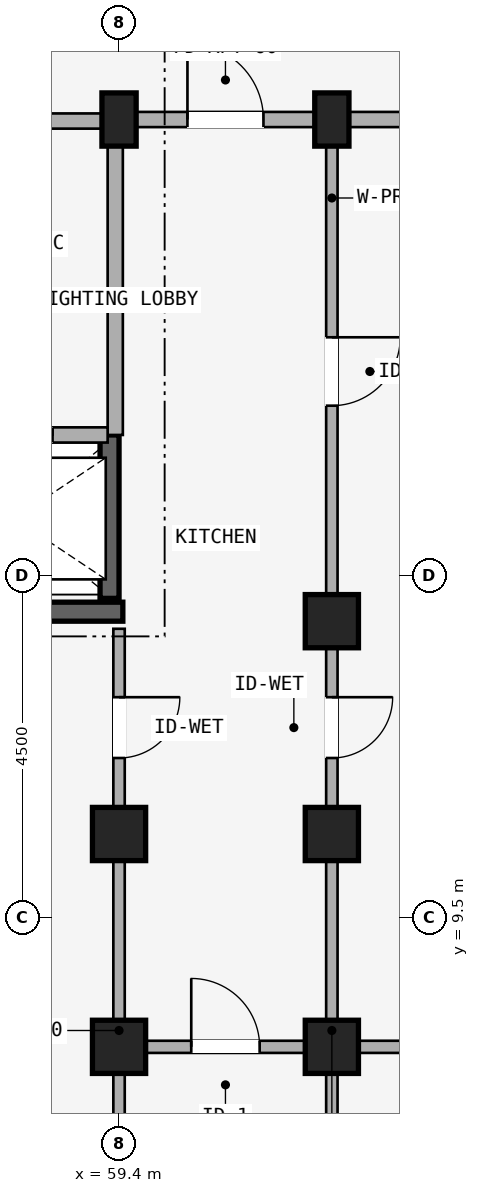
"""IFC4 building model, lengths in metres.
Left out: names, types, materials, properties, quantities, classifications, styles, units other than length and angle.
Written with IfcOpenShell. Run it as: python <this file> out.ifc"""

import sys

from ifc_helpers import new_model, si_unit, direction, frame, frame_2d, origin, origin_2d, place, context, subcontext, project, spatial, rectangle, extrude, element, fill, save


model = new_model("IFC4")
c1 = context("Model", 3, precision=1e-05, world=origin(), true_north=direction((0.0, 1.0)))
c2 = subcontext(c1, "Body", "Model", "MODEL_VIEW")
j1 = project(units=[si_unit("LENGTHUNIT", "METRE"), si_unit("PLANEANGLEUNIT", "RADIAN")], contexts=[c1])
p1 = place(None, origin())
s1 = spatial("IfcSite", under=j1, at=p1, CompositionType="ELEMENT")
p2 = place(p1, origin())
s2 = spatial("IfcBuilding", under=s1, at=p2, CompositionType="ELEMENT")
p3 = place(p2, frame((0.0, 0.0, 21.3)))
s3 = spatial("IfcBuildingStorey", under=s2, at=p3, CompositionType="ELEMENT", Elevation=21.3)
p4 = place(p3, frame((56.65, 13.525, 0.0), z_axis=(0.0, 0.0, 1.0), x_axis=(1.0, 0.0, 0.0)))
e1 = element("IfcWall", 1, at=p4, inside=s3, PredefinedType="SHEAR", context=c2, shape_type="SweptSolid", body=[
    extrude(rectangle(XDim=2.8, YDim=0.25, at=frame_2d((1.4, 0.0))), origin(), (0.0, 0.0, 1.0), 2.93),
])
p5 = place(p3, frame((59.275, 15.85, 0.0), z_axis=(0.0, 0.0, 1.0), x_axis=(0.0, -1.0, 0.0)))
e2 = element("IfcWall", 2, at=p5, inside=s3, PredefinedType="SHEAR", context=c2, shape_type="SweptSolid", body=[
    extrude(rectangle(XDim=2.15, YDim=0.25, at=frame_2d((1.075, 0.0))), origin(), (0.0, 0.0, 1.0), 2.93),
])
p6 = place(p3, frame((59.4, 20.0, 0.0), z_axis=(0.0, 0.0, 1.0), x_axis=(1.0, 0.0, 0.0)))
e3 = element("IfcColumn", 3, at=p6, inside=s3, PredefinedType="COLUMN", context=c2, shape_type="SweptSolid", body=[
    extrude(rectangle(XDim=0.45, YDim=0.7, at=origin_2d()), origin(), (0.0, 0.0, 1.0), 2.93),
])
for number, where, z_axis, x_axis in (
    (4, (59.4, 10.6, 0.0), (0.0, 0.0, 1.0), (1.0, 0.0, 0.0)),
    (5, (59.4, 7.8, 0.0), (0.0, 0.0, 1.0), (1.0, 0.0, 0.0)),
):
    element("IfcColumn", number, at=place(p3, frame(where, z_axis=z_axis, x_axis=x_axis)), inside=s3, PredefinedType="COLUMN", context=c2, shape_type="SweptSolid", body=[
        extrude(rectangle(XDim=0.7, YDim=0.7, at=origin_2d()), origin(), (0.0, 0.0, 1.0), 2.93),
    ])
p7 = place(p3, frame((62.2, 20.0, 0.0), z_axis=(0.0, 0.0, 1.0), x_axis=(1.0, 0.0, 0.0)))
e6 = element("IfcColumn", 6, at=p7, inside=s3, PredefinedType="COLUMN", context=c2, shape_type="SweptSolid", body=[
    extrude(rectangle(XDim=0.45, YDim=0.7, at=origin_2d()), origin(), (0.0, 0.0, 1.0), 2.93),
])
for number, where, z_axis, x_axis in (
    (7, (62.2, 13.4, 0.0), (0.0, 0.0, 1.0), (1.0, 0.0, 0.0)),
    (8, (62.2, 10.6, 0.0), (0.0, 0.0, 1.0), (1.0, 0.0, 0.0)),
    (9, (62.2, 7.8, 0.0), (0.0, 0.0, 1.0), (1.0, 0.0, 0.0)),
):
    element("IfcColumn", number, at=place(p3, frame(where, z_axis=z_axis, x_axis=x_axis)), inside=s3, PredefinedType="COLUMN", context=c2, shape_type="SweptSolid", body=[
        extrude(rectangle(XDim=0.7, YDim=0.7, at=origin_2d()), origin(), (0.0, 0.0, 1.0), 2.93),
    ])
p8 = place(p3, frame((53.7, 19.98, 0.0), z_axis=(0.0, 0.0, 1.0), x_axis=(1.0, 0.0, 0.0)))
e10 = element("IfcWall", 10, at=p8, inside=s3, PredefinedType="STANDARD", context=c2, shape_type="SweptSolid", body=[
    extrude(rectangle(XDim=5.65, YDim=0.2, at=frame_2d((2.825, 0.0))), origin(), (0.0, 0.0, 1.0), 2.372),
])
p9 = place(p8, frame((1.923, 0.0, 0.0)))
e11 = element("IfcOpeningElement", 11, at=p9, cuts=e10, PredefinedType="OPENING", context=c2, shape_type="SweptSolid", body=[
    extrude(rectangle(XDim=1.24, YDim=2.15, at=frame_2d((0.62, 1.075))), frame((0.0, 0.11, 0.0), z_axis=(0.0, -1.0, 0.0), x_axis=(1.0, 0.0, 0.0)), (0.0, 0.0, 1.0), 0.22),
])
p10 = place(p3, frame((59.35, 19.98, 0.0), z_axis=(0.0, 0.0, 1.0), x_axis=(0.0, -1.0, 0.0)))
e12 = element("IfcWall", 12, at=p10, inside=s3, PredefinedType="STANDARD", context=c2, shape_type="SweptSolid", body=[
    extrude(rectangle(XDim=4.13, YDim=0.2, at=frame_2d((2.065, 0.0))), origin(), (0.0, 0.0, 1.0), 2.372),
])
p11 = place(p3, frame((56.7, 15.85, 0.0), z_axis=(0.0, 0.0, 1.0), x_axis=(1.0, 0.0, 0.0)))
e13 = element("IfcWall", 13, at=p11, inside=s3, PredefinedType="STANDARD", context=c2, shape_type="SweptSolid", body=[
    extrude(rectangle(XDim=2.55, YDim=0.2, at=frame_2d((1.275, 0.0))), origin(), (0.0, 0.0, 1.0), 2.372),
])
p12 = place(p11, frame((0.725, 0.0, 0.0)))
e14 = element("IfcOpeningElement", 14, at=p12, cuts=e13, PredefinedType="OPENING", context=c2, shape_type="SweptSolid", body=[
    extrude(rectangle(XDim=1.1, YDim=2.15, at=frame_2d((0.55, 1.075))), frame((0.0, 0.11, 0.0), z_axis=(0.0, -1.0, 0.0), x_axis=(1.0, 0.0, 0.0)), (0.0, 0.0, 1.0), 0.22),
])
p13 = place(p3, frame((59.4, 20.0, 0.0), z_axis=(0.0, 0.0, 1.0), x_axis=(1.0, 0.0, 0.0)))
e15 = element("IfcWall", 15, at=p13, inside=s3, PredefinedType="STANDARD", context=c2, shape_type="SweptSolid", body=[
    extrude(rectangle(XDim=2.8, YDim=0.2, at=frame_2d((1.4, 0.0))), origin(), (0.0, 0.0, 1.0), 2.372),
])
p14 = place(p13, frame((0.9, 0.0, 0.0)))
e16 = element("IfcOpeningElement", 16, at=p14, cuts=e15, PredefinedType="OPENING", context=c2, shape_type="SweptSolid", body=[
    extrude(rectangle(XDim=1.0, YDim=2.15, at=frame_2d((0.5, 1.075))), frame((0.0, 0.11, 0.0), z_axis=(0.0, -1.0, 0.0), x_axis=(1.0, 0.0, 0.0)), (0.0, 0.0, 1.0), 0.22),
])
p15 = place(p3, frame((59.48, 7.8, 0.0), z_axis=(0.0, 0.0, 1.0), x_axis=(1.0, 0.0, 0.0)))
e17 = element("IfcWall", 17, at=p15, inside=s3, PredefinedType="PLUMBINGWALL", context=c2, shape_type="SweptSolid", body=[
    extrude(rectangle(XDim=2.64, YDim=0.16, at=frame_2d((1.32, 0.0))), origin(), (0.0, 0.0, 1.0), 2.372),
])
p16 = place(p15, frame((0.87, 0.0, 0.0)))
e18 = element("IfcOpeningElement", 18, at=p16, cuts=e17, PredefinedType="OPENING", context=c2, shape_type="SweptSolid", body=[
    extrude(rectangle(XDim=0.9, YDim=2.1, at=frame_2d((0.45, 1.05))), frame((0.0, 0.09, 0.0), z_axis=(0.0, -1.0, 0.0), x_axis=(1.0, 0.0, 0.0)), (0.0, 0.0, 1.0), 0.18),
])
p17 = place(p3, frame((62.2, 20.0, 0.0), z_axis=(0.0, 0.0, 1.0), x_axis=(1.0, 0.0, 0.0)))
e19 = element("IfcWall", 19, at=p17, inside=s3, PredefinedType="STANDARD", context=c2, shape_type="SweptSolid", body=[
    extrude(rectangle(XDim=2.8, YDim=0.2, at=frame_2d((1.4, 0.0))), origin(), (0.0, 0.0, 1.0), 2.372),
])
p18 = place(p3, frame((62.28, 7.8, 0.0), z_axis=(0.0, 0.0, 1.0), x_axis=(1.0, 0.0, 0.0)))
e20 = element("IfcWall", 20, at=p18, inside=s3, PredefinedType="PLUMBINGWALL", context=c2, shape_type="SweptSolid", body=[
    extrude(rectangle(XDim=2.64, YDim=0.16, at=frame_2d((1.32, 0.0))), origin(), (0.0, 0.0, 1.0), 2.372),
])
p19 = place(p18, frame((0.92, 0.0, 0.0)))
e21 = element("IfcOpeningElement", 21, at=p19, cuts=e20, PredefinedType="OPENING", context=c2, shape_type="SweptSolid", body=[
    extrude(rectangle(XDim=0.8, YDim=2.1, at=frame_2d((0.4, 1.05))), frame((0.0, 0.09, 0.0), z_axis=(0.0, -1.0, 0.0), x_axis=(1.0, 0.0, 0.0)), (0.0, 0.0, 1.0), 0.18),
])
p20 = place(p3, frame((59.4, 13.3, 0.0), z_axis=(0.0, 0.0, 1.0), x_axis=(0.0, -1.0, 0.0)))
e22 = element("IfcWall", 22, at=p20, inside=s3, PredefinedType="PARTITIONING", context=c2, shape_type="SweptSolid", body=[
    extrude(rectangle(XDim=8.02, YDim=0.15, at=frame_2d((4.01, 0.0))), origin(), (0.0, 0.0, 1.0), 2.372),
])
p21 = place(p20, frame((0.9, 0.0, 0.0)))
e23 = element("IfcOpeningElement", 23, at=p21, cuts=e22, PredefinedType="OPENING", context=c2, shape_type="SweptSolid", body=[
    extrude(rectangle(XDim=0.8, YDim=2.1, at=frame_2d((0.4, 1.05))), frame((0.0, 0.085, 0.0), z_axis=(0.0, -1.0, 0.0), x_axis=(1.0, 0.0, 0.0)), (0.0, 0.0, 1.0), 0.17),
])
p22 = place(p3, frame((62.2, 19.95, 0.0), z_axis=(0.0, 0.0, 1.0), x_axis=(0.0, -1.0, 0.0)))
e24 = element("IfcWall", 24, at=p22, inside=s3, PredefinedType="PARTITIONING", context=c2, shape_type="SweptSolid", body=[
    extrude(rectangle(XDim=6.53, YDim=0.15, at=frame_2d((3.265, 0.0))), origin(), (0.0, 0.0, 1.0), 2.372),
])
p23 = place(p22, frame((2.815, 0.0, 0.0)))
e25 = element("IfcOpeningElement", 25, at=p23, cuts=e24, PredefinedType="OPENING", context=c2, shape_type="SweptSolid", body=[
    extrude(rectangle(XDim=0.9, YDim=2.1, at=frame_2d((0.45, 1.05))), frame((0.0, 0.085, 0.0), z_axis=(0.0, -1.0, 0.0), x_axis=(1.0, 0.0, 0.0)), (0.0, 0.0, 1.0), 0.17),
])
p24 = place(p3, frame((62.2, 13.3, 0.0), z_axis=(0.0, 0.0, 1.0), x_axis=(0.0, -1.0, 0.0)))
e26 = element("IfcWall", 26, at=p24, inside=s3, PredefinedType="PARTITIONING", context=c2, shape_type="SweptSolid", body=[
    extrude(rectangle(XDim=8.02, YDim=0.15, at=frame_2d((4.01, 0.0))), origin(), (0.0, 0.0, 1.0), 2.372),
])
p25 = place(p24, frame((0.9, 0.0, 0.0)))
e27 = element("IfcOpeningElement", 27, at=p25, cuts=e26, PredefinedType="OPENING", context=c2, shape_type="SweptSolid", body=[
    extrude(rectangle(XDim=0.8, YDim=2.1, at=frame_2d((0.4, 1.05))), frame((0.0, 0.085, 0.0), z_axis=(0.0, -1.0, 0.0), x_axis=(1.0, 0.0, 0.0)), (0.0, 0.0, 1.0), 0.17),
])
p26 = place(p12, origin())
e28 = element("IfcDoor", 28, at=p26, inside=s3, OperationType="SLIDING_TO_LEFT", PredefinedType="DOOR", context=c2, shape_type="SweptSolid", body=[
    extrude(rectangle(XDim=1.1, YDim=2.15, at=frame_2d((0.55, 1.075))), frame((0.0, 0.025, 0.0), z_axis=(0.0, -1.0, 0.0), x_axis=(1.0, 0.0, 0.0)), (0.0, 0.0, 1.0), 0.05),
])
fill(e14, e28)
p27 = place(p16, origin())
e29 = element("IfcDoor", 29, at=p27, inside=s3, OperationType="SINGLE_SWING_LEFT", PredefinedType="DOOR", context=c2, shape_type="SweptSolid", body=[
    extrude(rectangle(XDim=0.9, YDim=2.1, at=frame_2d((0.45, 1.05))), frame((0.0, 0.025, 0.0), z_axis=(0.0, -1.0, 0.0), x_axis=(1.0, 0.0, 0.0)), (0.0, 0.0, 1.0), 0.05),
])
fill(e18, e29)
p28 = place(p14, frame((1.0, 0.0, 0.0), z_axis=(0.0, 0.0, 1.0), x_axis=(-1.0, 0.0, 0.0)))
e30 = element("IfcDoor", 30, at=p28, inside=s3, OperationType="SINGLE_SWING_RIGHT", PredefinedType="DOOR", context=c2, shape_type="SweptSolid", body=[
    extrude(rectangle(XDim=1.0, YDim=2.15, at=frame_2d((0.5, 1.075))), frame((0.0, 0.025, 0.0), z_axis=(0.0, -1.0, 0.0), x_axis=(1.0, 0.0, 0.0)), (0.0, 0.0, 1.0), 0.05),
])
fill(e16, e30)
p29 = place(p21, frame((0.8, 0.0, 0.0), z_axis=(0.0, 0.0, 1.0), x_axis=(-1.0, 0.0, 0.0)))
e31 = element("IfcDoor", 31, at=p29, inside=s3, OperationType="SINGLE_SWING_RIGHT", PredefinedType="DOOR", context=c2, shape_type="SweptSolid", body=[
    extrude(rectangle(XDim=0.8, YDim=2.1, at=frame_2d((0.4, 1.05))), frame((0.0, 0.025, 0.0), z_axis=(0.0, -1.0, 0.0), x_axis=(1.0, 0.0, 0.0)), (0.0, 0.0, 1.0), 0.05),
])
fill(e23, e31)
p30 = place(p23, frame((0.9, 0.0, 0.0), z_axis=(0.0, 0.0, 1.0), x_axis=(-1.0, 0.0, 0.0)))
e32 = element("IfcDoor", 32, at=p30, inside=s3, OperationType="SINGLE_SWING_RIGHT", PredefinedType="DOOR", context=c2, shape_type="SweptSolid", body=[
    extrude(rectangle(XDim=0.9, YDim=2.1, at=frame_2d((0.45, 1.05))), frame((0.0, 0.025, 0.0), z_axis=(0.0, -1.0, 0.0), x_axis=(1.0, 0.0, 0.0)), (0.0, 0.0, 1.0), 0.05),
])
fill(e25, e32)
p31 = place(p25, origin())
e33 = element("IfcDoor", 33, at=p31, inside=s3, OperationType="SINGLE_SWING_LEFT", PredefinedType="DOOR", context=c2, shape_type="SweptSolid", body=[
    extrude(rectangle(XDim=0.8, YDim=2.1, at=frame_2d((0.4, 1.05))), frame((0.0, 0.025, 0.0), z_axis=(0.0, -1.0, 0.0), x_axis=(1.0, 0.0, 0.0)), (0.0, 0.0, 1.0), 0.05),
])
fill(e27, e33)
save(model, sys.argv[1])
